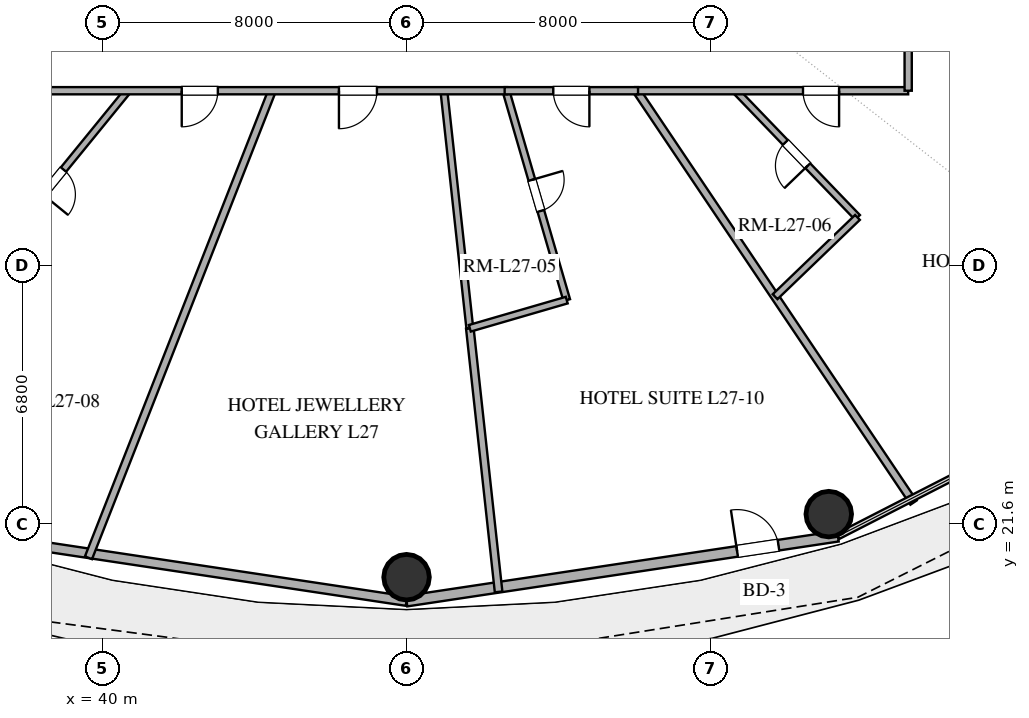
"""IFC4 building model, lengths in metres.
Left out: names, types, materials, properties, quantities, classifications, styles, units other than length and angle.
Written with IfcOpenShell. Run it as: python <this file> out.ifc"""

import sys

from ifc_helpers import new_model, si_unit, direction, frame, frame_2d, origin, origin_2d, place, context, subcontext, project, spatial, rectangle, hollow_circle, extrude, element, fill, save


model = new_model("IFC4")
c1 = context("Model", 3, precision=1e-05, world=origin(), true_north=direction((0.0, 1.0)))
c2 = subcontext(c1, "Body", "Model", "MODEL_VIEW")
j1 = project(units=[si_unit("LENGTHUNIT", "METRE"), si_unit("PLANEANGLEUNIT", "RADIAN")], contexts=[c1])
p1 = place(None, origin())
s1 = spatial("IfcSite", under=j1, at=p1, CompositionType="ELEMENT")
p2 = place(p1, origin())
s2 = spatial("IfcBuilding", under=s1, at=p2, CompositionType="ELEMENT")
p3 = place(p2, frame((0.0, 0.0, 109.2)))
s3 = spatial("IfcBuildingStorey", under=s2, at=p3, CompositionType="ELEMENT", Elevation=109.2)
for number, where, z_axis, x_axis in (
    (1, (48.0, 20.2, 0.0), (0.0, 0.0, 1.0), (1.0, 0.0, 0.0)),
    (2, (59.11, 21.859, 0.0), (0.0, 0.0, 1.0), (1.0, 0.0, 0.0)),
):
    element("IfcColumn", number, at=place(p3, frame(where, z_axis=z_axis, x_axis=x_axis)), inside=s3, PredefinedType="COLUMN", context=c2, shape_type="SweptSolid", body=[
        extrude(hollow_circle(Radius=0.6, WallThickness=0.032, at=origin_2d()), origin(), (0.0, 0.0, 1.0), 3.38),
    ])
p4 = place(p3, frame((36.649, 21.277, 0.0), z_axis=(0.0, 0.0, 1.0), x_axis=(0.988877774656, -0.148730450117, 0.0)))
e3 = element("IfcWall", 3, at=p4, inside=s3, PredefinedType="SOLIDWALL", context=c2, shape_type="SweptSolid", body=[
    extrude(rectangle(XDim=11.479, YDim=0.25, at=frame_2d((5.74, 0.0))), origin(), (0.0, 0.0, 1.0), 3.38),
])
p5 = place(p3, frame((48.0, 19.57, 0.0), z_axis=(0.0, 0.0, 1.0), x_axis=(0.988877774656, 0.148730450117, 0.0)))
e4 = element("IfcWall", 4, at=p5, inside=s3, PredefinedType="SOLIDWALL", context=c2, shape_type="SweptSolid", body=[
    extrude(rectangle(XDim=11.479, YDim=0.28, at=frame_2d((5.74, 0.0))), origin(), (0.0, 0.0, 1.0), 3.38),
])
p6 = place(p5, frame((8.797, 0.0, 0.0)))
e5 = element("IfcOpeningElement", 5, at=p6, cuts=e4, PredefinedType="OPENING", context=c2, shape_type="SweptSolid", body=[
    extrude(rectangle(XDim=1.1, YDim=2.25, at=frame_2d((0.55, 1.125))), frame((0.0, 0.15, 0.0), z_axis=(0.0, -1.0, 0.0), x_axis=(1.0, 0.0, 0.0)), (0.0, 0.0, 1.0), 0.3),
])
p7 = place(p3, frame((39.63, 20.711, 0.0), z_axis=(0.0, 0.0, 1.0), x_axis=(0.365888605627, 0.930658652929, 0.0)))
e6 = element("IfcWall", 6, at=p7, inside=s3, PredefinedType="PARTITIONING", context=c2, shape_type="SweptSolid", body=[
    extrude(rectangle(XDim=13.205, YDim=0.2, at=frame_2d((6.603, 0.0))), origin(), (0.0, 0.0, 1.0), 2.74),
])
p8 = place(p3, frame((50.422, 19.813, 0.0), z_axis=(0.0, 0.0, 1.0), x_axis=(-0.108534266563, 0.994092708444, 0.0)))
e7 = element("IfcWall", 7, at=p8, inside=s3, PredefinedType="PARTITIONING", context=c2, shape_type="SweptSolid", body=[
    extrude(rectangle(XDim=6.978, YDim=0.2, at=frame_2d((3.489, 0.0))), origin(), (0.0, 0.0, 1.0), 2.74),
])
p9 = place(p3, frame((54.053, 33.0, 0.0), z_axis=(0.0, 0.0, 1.0), x_axis=(0.558073496329, -0.829791523634, 0.0)))
e8 = element("IfcWall", 8, at=p9, inside=s3, PredefinedType="PARTITIONING", context=c2, shape_type="SweptSolid", body=[
    extrude(rectangle(XDim=13.06, YDim=0.2, at=frame_2d((6.53, 0.0))), origin(), (0.0, 0.0, 1.0), 2.74),
])
p10 = place(p3, frame((49.665, 26.75, 0.0), z_axis=(0.0, 0.0, 1.0), x_axis=(-0.108526347032, 0.99409357306, 0.0)))
e9 = element("IfcWall", 9, at=p10, inside=s3, PredefinedType="PLUMBINGWALL", context=c2, shape_type="SweptSolid", body=[
    extrude(rectangle(XDim=6.288, YDim=0.18, at=frame_2d((3.144, 0.0))), origin(), (0.0, 0.0, 1.0), 2.74),
])
p11 = place(p3, frame((40.664, 33.0, 0.0), z_axis=(0.0, 0.0, 1.0), x_axis=(-0.631841179317, -0.775097880347, 0.0)))
e10 = element("IfcWall", 10, at=p11, inside=s3, PredefinedType="PLUMBINGWALL", context=c2, shape_type="SweptSolid", body=[
    extrude(rectangle(XDim=6.202, YDim=0.18, at=frame_2d((3.101, 0.0))), origin(), (0.0, 0.0, 1.0), 2.74),
])
p12 = place(p11, frame((2.676, 0.0, 0.0)))
e11 = element("IfcOpeningElement", 11, at=p12, cuts=e10, PredefinedType="OPENING", context=c2, shape_type="SweptSolid", body=[
    extrude(rectangle(XDim=0.85, YDim=2.1, at=frame_2d((0.425, 1.05))), frame((0.0, 0.1, 0.0), z_axis=(0.0, -1.0, 0.0), x_axis=(1.0, 0.0, 0.0)), (0.0, 0.0, 1.0), 0.2),
])
p13 = place(p3, frame((50.615, 33.0, 0.0), z_axis=(0.0, 0.0, 1.0), x_axis=(0.278967165891, -0.960300640609, 0.0)))
e12 = element("IfcWall", 12, at=p13, inside=s3, PredefinedType="PLUMBINGWALL", context=c2, shape_type="SweptSolid", body=[
    extrude(rectangle(XDim=5.738, YDim=0.18, at=frame_2d((2.869, 0.0))), origin(), (0.0, 0.0, 1.0), 2.74),
])
p14 = place(p13, frame((2.444, 0.0, 0.0)))
e13 = element("IfcOpeningElement", 13, at=p14, cuts=e12, PredefinedType="OPENING", context=c2, shape_type="SweptSolid", body=[
    extrude(rectangle(XDim=0.85, YDim=2.1, at=frame_2d((0.425, 1.05))), frame((0.0, 0.1, 0.0), z_axis=(0.0, -1.0, 0.0), x_axis=(1.0, 0.0, 0.0)), (0.0, 0.0, 1.0), 0.2),
])
p15 = place(p3, frame((66.243, 32.143, 0.0), z_axis=(0.0, 0.0, 1.0), x_axis=(-0.879784992633, 0.475371819461, 0.0)))
e14 = element("IfcWall", 14, at=p15, inside=s3, PredefinedType="PLUMBINGWALL", context=c2, shape_type="SweptSolid", body=[
    extrude(rectangle(XDim=5.732, YDim=0.18, at=frame_2d((2.866, 0.0))), origin(), (0.0, 0.0, 1.0), 2.74),
])
p16 = place(p3, frame((59.866, 29.666, 0.0), z_axis=(0.0, 0.0, 1.0), x_axis=(-0.693306956927, 0.720642396392, 0.0)))
e15 = element("IfcWall", 15, at=p16, inside=s3, PredefinedType="PLUMBINGWALL", context=c2, shape_type="SweptSolid", body=[
    extrude(rectangle(XDim=4.626, YDim=0.18, at=frame_2d((2.313, 0.0))), origin(), (0.0, 0.0, 1.0), 2.74),
])
p17 = place(p16, frame((1.888, 0.0, 0.0)))
e16 = element("IfcOpeningElement", 16, at=p17, cuts=e15, PredefinedType="OPENING", context=c2, shape_type="SweptSolid", body=[
    extrude(rectangle(XDim=0.85, YDim=2.1, at=frame_2d((0.425, 1.05))), frame((0.0, 0.1, 0.0), z_axis=(0.0, -1.0, 0.0), x_axis=(1.0, 0.0, 0.0)), (0.0, 0.0, 1.0), 0.2),
])
p18 = place(p3, frame((50.648, 33.0, 0.0), z_axis=(0.0, 0.0, 1.0), x_axis=(-1.0, 0.0, 0.0)))
e17 = element("IfcWall", 17, at=p18, inside=s3, PredefinedType="PARTITIONING", context=c2, shape_type="SweptSolid", body=[
    extrude(rectangle(XDim=15.848, YDim=0.19, at=frame_2d((7.924, 0.0))), origin(), (0.0, 0.0, 1.0), 2.74),
])
p19 = place(p18, frame((3.427, 0.0, 0.0)))
e18 = element("IfcOpeningElement", 18, at=p19, cuts=e17, PredefinedType="OPENING", context=c2, shape_type="SweptSolid", body=[
    extrude(rectangle(XDim=1.0, YDim=2.2, at=frame_2d((0.5, 1.1))), frame((0.0, 0.105, 0.0), z_axis=(0.0, -1.0, 0.0), x_axis=(1.0, 0.0, 0.0)), (0.0, 0.0, 1.0), 0.21),
])
p20 = place(p18, frame((7.614, 0.0, 0.0)))
e19 = element("IfcOpeningElement", 19, at=p20, cuts=e17, PredefinedType="OPENING", context=c2, shape_type="SweptSolid", body=[
    extrude(rectangle(XDim=0.95, YDim=2.15, at=frame_2d((0.475, 1.075))), frame((0.0, 0.105, 0.0), z_axis=(0.0, -1.0, 0.0), x_axis=(1.0, 0.0, 0.0)), (0.0, 0.0, 1.0), 0.21),
])
p21 = place(p3, frame((61.2, 33.0, 0.0), z_axis=(0.0, 0.0, 1.0), x_axis=(-1.0, 0.0, 0.0)))
e20 = element("IfcWall", 20, at=p21, inside=s3, PredefinedType="PARTITIONING", context=c2, shape_type="SweptSolid", body=[
    extrude(rectangle(XDim=7.186, YDim=0.19, at=frame_2d((3.593, 0.0))), origin(), (0.0, 0.0, 1.0), 2.74),
])
p22 = place(p21, frame((1.818, 0.0, 0.0)))
e21 = element("IfcOpeningElement", 21, at=p22, cuts=e20, PredefinedType="OPENING", context=c2, shape_type="SweptSolid", body=[
    extrude(rectangle(XDim=0.95, YDim=2.15, at=frame_2d((0.475, 1.075))), frame((0.0, 0.105, 0.0), z_axis=(0.0, -1.0, 0.0), x_axis=(1.0, 0.0, 0.0)), (0.0, 0.0, 1.0), 0.21),
])
p23 = place(p3, frame((61.2, 41.873, 0.0), z_axis=(0.0, 0.0, 1.0), x_axis=(0.0, -1.0, 0.0)))
e22 = element("IfcWall", 22, at=p23, inside=s3, PredefinedType="PARTITIONING", context=c2, shape_type="SweptSolid", body=[
    extrude(rectangle(XDim=8.873, YDim=0.19, at=frame_2d((4.436, 0.0))), origin(), (0.0, 0.0, 1.0), 2.74),
])
p24 = place(p23, frame((1.676, 0.0, 0.0)))
e23 = element("IfcOpeningElement", 23, at=p24, cuts=e22, PredefinedType="OPENING", context=c2, shape_type="SweptSolid", body=[
    extrude(rectangle(XDim=0.95, YDim=2.15, at=frame_2d((0.475, 1.075))), frame((0.0, 0.105, 0.0), z_axis=(0.0, -1.0, 0.0), x_axis=(1.0, 0.0, 0.0)), (0.0, 0.0, 1.0), 0.21),
])
p25 = place(p3, frame((54.092, 33.0, 0.0), z_axis=(0.0, 0.0, 1.0), x_axis=(-1.0, 0.0, 0.0)))
e24 = element("IfcWall", 24, at=p25, inside=s3, PredefinedType="PARTITIONING", context=c2, shape_type="SweptSolid", body=[
    extrude(rectangle(XDim=3.51, YDim=0.19, at=frame_2d((1.755, 0.0))), origin(), (0.0, 0.0, 1.0), 2.74),
])
p26 = place(p25, frame((1.28, 0.0, 0.0)))
e25 = element("IfcOpeningElement", 25, at=p26, cuts=e24, PredefinedType="OPENING", context=c2, shape_type="SweptSolid", body=[
    extrude(rectangle(XDim=0.95, YDim=2.15, at=frame_2d((0.475, 1.075))), frame((0.0, 0.105, 0.0), z_axis=(0.0, -1.0, 0.0), x_axis=(1.0, 0.0, 0.0)), (0.0, 0.0, 1.0), 0.21),
])
p27 = place(p3, frame((57.698, 27.58, 0.0), z_axis=(0.0, 0.0, 1.0), x_axis=(0.720688028056, 0.693259522991, 0.0)))
e26 = element("IfcWall", 26, at=p27, inside=s3, PredefinedType="PLUMBINGWALL", context=c2, shape_type="SweptSolid", body=[
    extrude(rectangle(XDim=3.009, YDim=0.18, at=frame_2d((1.504, 0.0))), origin(), (0.0, 0.0, 1.0), 2.74),
])
p28 = place(p3, frame((52.215, 27.49, 0.0), z_axis=(0.0, 0.0, 1.0), x_axis=(-0.960314459225, -0.278919593078, 0.0)))
e27 = element("IfcWall", 27, at=p28, inside=s3, PredefinedType="PLUMBINGWALL", context=c2, shape_type="SweptSolid", body=[
    extrude(rectangle(XDim=2.656, YDim=0.18, at=frame_2d((1.328, 0.0))), origin(), (0.0, 0.0, 1.0), 2.74),
])
p29 = place(p6, origin())
e28 = element("IfcDoor", 28, at=p29, inside=s3, OperationType="SINGLE_SWING_LEFT", PredefinedType="DOOR", context=c2, shape_type="SweptSolid", body=[
    extrude(rectangle(XDim=1.1, YDim=2.25, at=frame_2d((0.55, 1.125))), frame((0.0, 0.025, 0.0), z_axis=(0.0, -1.0, 0.0), x_axis=(1.0, 0.0, 0.0)), (0.0, 0.0, 1.0), 0.05),
])
fill(e5, e28)
p30 = place(p12, origin())
e29 = element("IfcDoor", 29, at=p30, inside=s3, OperationType="SINGLE_SWING_RIGHT", PredefinedType="DOOR", context=c2, shape_type="SweptSolid", body=[
    extrude(rectangle(XDim=0.85, YDim=2.1, at=frame_2d((0.425, 1.05))), frame((0.0, 0.025, 0.0), z_axis=(0.0, -1.0, 0.0), x_axis=(1.0, 0.0, 0.0)), (0.0, 0.0, 1.0), 0.05),
])
fill(e11, e29)
p31 = place(p14, origin())
e30 = element("IfcDoor", 30, at=p31, inside=s3, OperationType="SINGLE_SWING_LEFT", PredefinedType="DOOR", context=c2, shape_type="SweptSolid", body=[
    extrude(rectangle(XDim=0.85, YDim=2.1, at=frame_2d((0.425, 1.05))), frame((0.0, 0.025, 0.0), z_axis=(0.0, -1.0, 0.0), x_axis=(1.0, 0.0, 0.0)), (0.0, 0.0, 1.0), 0.05),
])
fill(e13, e30)
p32 = place(p17, origin())
e31 = element("IfcDoor", 31, at=p32, inside=s3, OperationType="SINGLE_SWING_LEFT", PredefinedType="DOOR", context=c2, shape_type="SweptSolid", body=[
    extrude(rectangle(XDim=0.85, YDim=2.1, at=frame_2d((0.425, 1.05))), frame((0.0, 0.025, 0.0), z_axis=(0.0, -1.0, 0.0), x_axis=(1.0, 0.0, 0.0)), (0.0, 0.0, 1.0), 0.05),
])
fill(e16, e31)
p33 = place(p19, origin())
e32 = element("IfcDoor", 32, at=p33, inside=s3, OperationType="SINGLE_SWING_RIGHT", PredefinedType="DOOR", context=c2, shape_type="SweptSolid", body=[
    extrude(rectangle(XDim=1.0, YDim=2.2, at=frame_2d((0.5, 1.1))), frame((0.0, 0.025, 0.0), z_axis=(0.0, -1.0, 0.0), x_axis=(1.0, 0.0, 0.0)), (0.0, 0.0, 1.0), 0.05),
])
fill(e18, e32)
p34 = place(p20, origin())
e33 = element("IfcDoor", 33, at=p34, inside=s3, OperationType="SINGLE_SWING_RIGHT", PredefinedType="DOOR", context=c2, shape_type="SweptSolid", body=[
    extrude(rectangle(XDim=0.95, YDim=2.15, at=frame_2d((0.475, 1.075))), frame((0.0, 0.025, 0.0), z_axis=(0.0, -1.0, 0.0), x_axis=(1.0, 0.0, 0.0)), (0.0, 0.0, 1.0), 0.05),
])
fill(e19, e33)
p35 = place(p22, origin())
e34 = element("IfcDoor", 34, at=p35, inside=s3, OperationType="SINGLE_SWING_LEFT", PredefinedType="DOOR", context=c2, shape_type="SweptSolid", body=[
    extrude(rectangle(XDim=0.95, YDim=2.15, at=frame_2d((0.475, 1.075))), frame((0.0, 0.025, 0.0), z_axis=(0.0, -1.0, 0.0), x_axis=(1.0, 0.0, 0.0)), (0.0, 0.0, 1.0), 0.05),
])
fill(e21, e34)
p36 = place(p26, origin())
e35 = element("IfcDoor", 35, at=p36, inside=s3, OperationType="SINGLE_SWING_LEFT", PredefinedType="DOOR", context=c2, shape_type="SweptSolid", body=[
    extrude(rectangle(XDim=0.95, YDim=2.15, at=frame_2d((0.475, 1.075))), frame((0.0, 0.025, 0.0), z_axis=(0.0, -1.0, 0.0), x_axis=(1.0, 0.0, 0.0)), (0.0, 0.0, 1.0), 0.05),
])
fill(e25, e35)
save(model, sys.argv[1])
